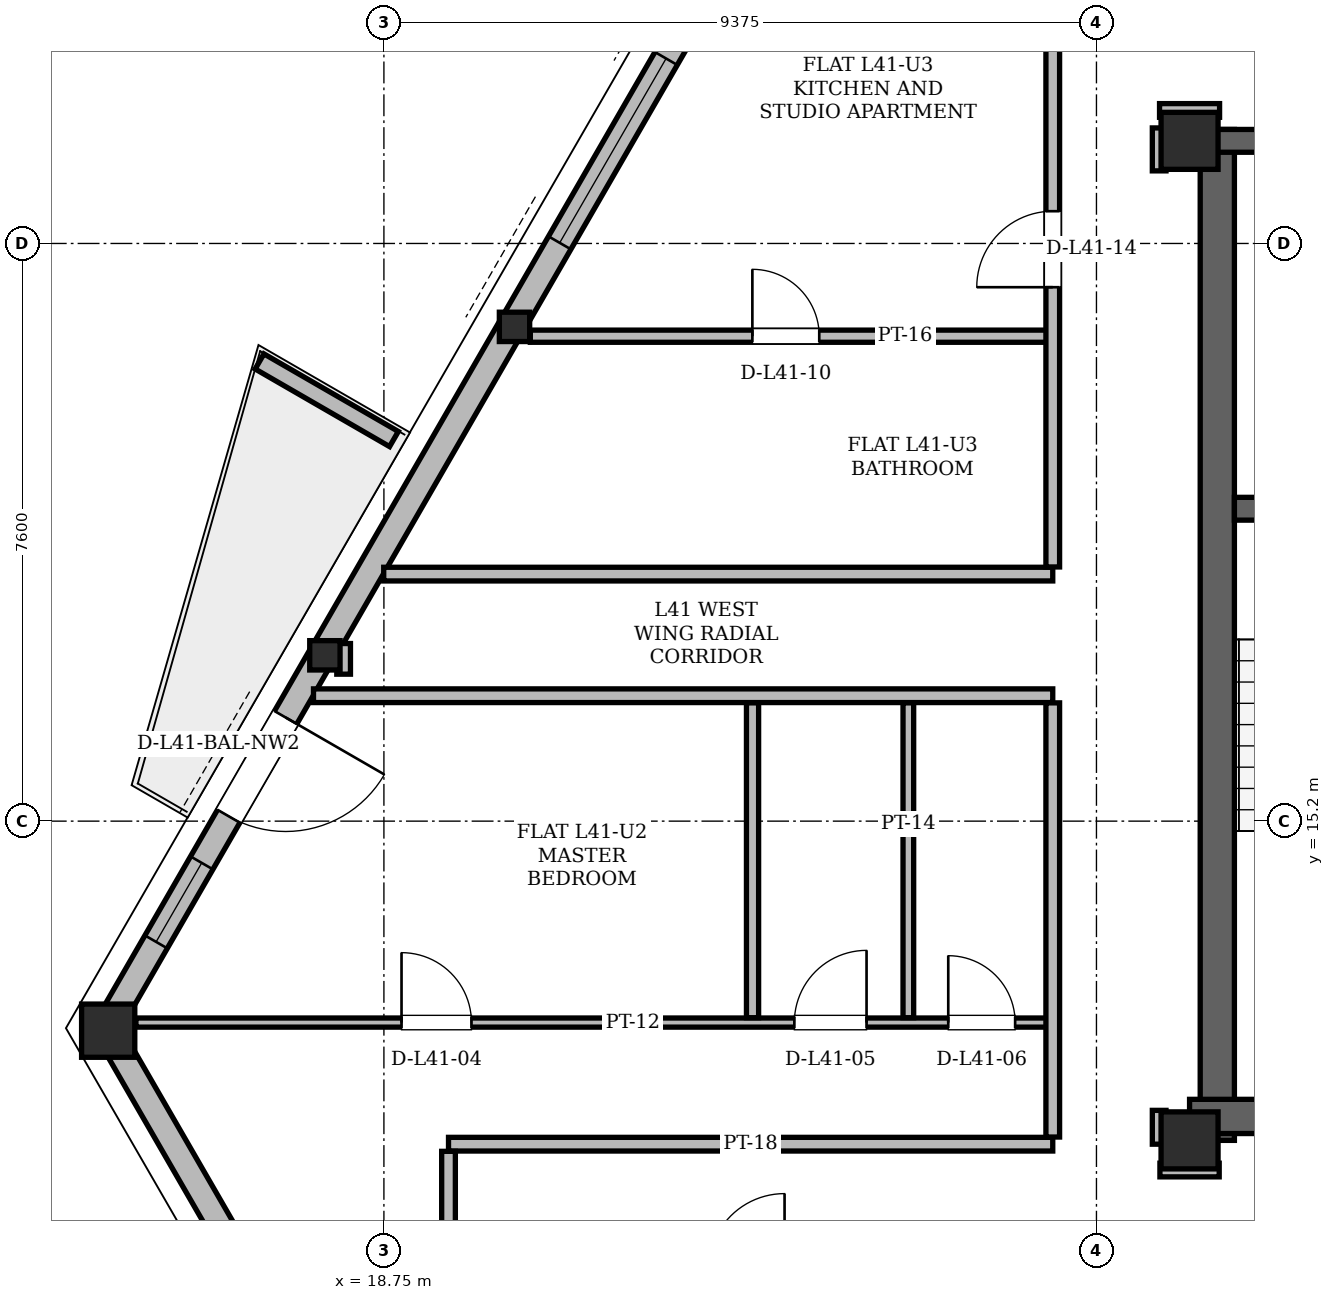
"""IFC4 building model, lengths in metres.
Left out: names, types, materials, properties, quantities, classifications, styles, units other than length and angle.
Written with IfcOpenShell. Run it as: python <this file> out.ifc"""

import sys

from ifc_helpers import new_model, si_unit, direction, frame, frame_2d, origin, origin_2d, place, context, subcontext, project, spatial, polyline, rectangle, hollow_rectangle, i_section, outline, extrude, element, fill, save


model = new_model("IFC4")
c1 = context("Model", 3, precision=1e-05, world=origin(), true_north=direction((0.0, 1.0)))
c2 = subcontext(c1, "Body", "Model", "MODEL_VIEW")
j1 = project(units=[si_unit("LENGTHUNIT", "METRE"), si_unit("PLANEANGLEUNIT", "RADIAN")], contexts=[c1])
p1 = place(None, origin())
s1 = spatial("IfcSite", under=j1, at=p1, CompositionType="ELEMENT")
p2 = place(p1, origin())
s2 = spatial("IfcBuilding", under=s1, at=p2, CompositionType="ELEMENT")
p3 = place(p2, frame((0.0, 0.0, 156.6)))
s3 = spatial("IfcBuildingStorey", under=s2, at=p3, CompositionType="ELEMENT", Elevation=156.6)
for number, where, z_axis, x_axis in (
    (1, (29.35, 11.0, 0.0), (0.0, 0.0, 1.0), (1.0, 0.0, 0.0)),
    (2, (29.35, 24.15, 0.0), (0.0, 0.0, 1.0), (1.0, 0.0, 0.0)),
):
    element("IfcColumn", number, at=place(p3, frame(where, z_axis=z_axis, x_axis=x_axis)), inside=s3, PredefinedType="COLUMN", context=c2, shape_type="SweptSolid", body=[
        extrude(hollow_rectangle(XDim=0.75, YDim=0.75, WallThickness=0.06, at=origin_2d()), origin(), (0.0, 0.0, 1.0), 3.6),
    ])
p4 = place(p3, frame((15.098, 12.477, 0.004), z_axis=(0.013729429674, -0.018555120301, 0.999733569643), x_axis=(0.803870057884, 0.594804951255, 0.0)))
e3 = element("IfcColumn", 3, at=p4, inside=s3, PredefinedType="COLUMN", context=c2, shape_type="SweptSolid", body=[
    extrude(hollow_rectangle(XDim=0.7, YDim=0.7, WallThickness=0.055, at=origin_2d()), origin(), (0.0, 0.0, 1.0), 3.592),
])
p5 = place(p3, frame((20.439, 21.727, 0.004), z_axis=(0.01644873519, -0.013729935985, 0.999770437635), x_axis=(0.640808251005, 0.767700973976, 0.0)))
e4 = element("IfcColumn", 4, at=p5, inside=s3, PredefinedType="COLUMN", context=c2, shape_type="SweptSolid", body=[
    extrude(i_section(OverallWidth=0.399, OverallDepth=0.386, WebThickness=0.021, FlangeThickness=0.033, at=origin_2d()), origin(), (0.0, 0.0, 1.0), 3.592),
])
p6 = place(p3, frame((17.946, 17.41, 0.004), z_axis=(0.0151570935, -0.016040690879, 0.999756449718), x_axis=(0.726842306935, 0.686804383248, 0.0)))
e5 = element("IfcColumn", 5, at=p6, inside=s3, PredefinedType="COLUMN", context=c2, shape_type="SweptSolid", body=[
    extrude(i_section(OverallWidth=0.399, OverallDepth=0.386, WebThickness=0.021, FlangeThickness=0.033, at=origin_2d()), origin(), (0.0, 0.0, 1.0), 3.592),
])
p7 = place(p3, frame((29.715, 11.0, 0.0), z_axis=(0.0, 0.0, 1.0), x_axis=(0.0, 1.0, 0.0)))
e6 = element("IfcWall", 6, at=p7, inside=s3, PredefinedType="SHEAR", context=c2, shape_type="SweptSolid", body=[
    extrude(rectangle(XDim=13.3, YDim=0.45, at=frame_2d((6.65, 0.0))), origin(), (0.0, 0.0, 1.0), 3.38),
])
p8 = place(p3, frame((29.35, 11.315, 0.0), z_axis=(0.0, 0.0, 1.0), x_axis=(1.0, 0.0, 0.0)))
e7 = element("IfcWall", 7, at=p8, inside=s3, PredefinedType="SHEAR", context=c2, shape_type="SweptSolid", body=[
    extrude(rectangle(XDim=7.1, YDim=0.45, at=frame_2d((3.55, 0.0))), origin(), (0.0, 0.0, 1.0), 3.38),
])
p9 = place(p3, frame((29.65, 24.15, 0.0), z_axis=(0.0, 0.0, 1.0), x_axis=(1.0, 0.0, 0.0)))
e8 = element("IfcWall", 8, at=p9, inside=s3, PredefinedType="SHEAR", context=c2, shape_type="SweptSolid", body=[
    extrude(rectangle(XDim=15.7, YDim=0.3, at=frame_2d((7.85, 0.0))), origin(), (0.0, 0.0, 1.0), 3.38),
])
p10 = place(p9, frame((1.7, 0.0, 0.0)))
e9 = element("IfcOpeningElement", 9, at=p10, cuts=e8, PredefinedType="OPENING", context=c2, shape_type="SweptSolid", body=[
    extrude(rectangle(XDim=1.2, YDim=2.2, at=frame_2d((0.6, 1.1))), frame((0.0, 0.15, 0.0), z_axis=(0.0, -1.0, 0.0), x_axis=(1.0, 0.0, 0.0)), (0.0, 0.0, 1.0), 0.3),
])
p11 = place(p9, frame((12.8, 0.0, 0.0)))
e10 = element("IfcOpeningElement", 10, at=p11, cuts=e8, PredefinedType="OPENING", context=c2, shape_type="SweptSolid", body=[
    extrude(rectangle(XDim=1.2, YDim=2.2, at=frame_2d((0.6, 1.1))), frame((0.0, 0.15, 0.0), z_axis=(0.0, -1.0, 0.0), x_axis=(1.0, 0.0, 0.0)), (0.0, 0.0, 1.0), 0.3),
])
p12 = place(p9, frame((6.55, 0.0, 0.0)))
e11 = element("IfcOpeningElement", 11, at=p12, cuts=e8, PredefinedType="OPENING", context=c2, shape_type="SweptSolid", body=[
    extrude(rectangle(XDim=0.9, YDim=2.05, at=frame_2d((0.45, 1.025))), frame((0.0, 0.15, 0.0), z_axis=(0.0, -1.0, 0.0), x_axis=(1.0, 0.0, 0.0)), (0.0, 0.0, 1.0), 0.3),
])
p13 = place(p9, frame((8.45, 0.0, 0.0)))
e12 = element("IfcOpeningElement", 12, at=p13, cuts=e8, PredefinedType="OPENING", context=c2, shape_type="SweptSolid", body=[
    extrude(rectangle(XDim=0.9, YDim=2.05, at=frame_2d((0.45, 1.025))), frame((0.0, 0.15, 0.0), z_axis=(0.0, -1.0, 0.0), x_axis=(1.0, 0.0, 0.0)), (0.0, 0.0, 1.0), 0.3),
])
p14 = place(p3, frame((29.94, 19.31, 0.0), z_axis=(0.0, 0.0, 1.0), x_axis=(1.0, 0.0, 0.0)))
e13 = element("IfcWall", 13, at=p14, inside=s3, PredefinedType="SHEAR", context=c2, shape_type="SweptSolid", body=[
    extrude(rectangle(XDim=4.01, YDim=0.3, at=frame_2d((2.005, 0.0))), origin(), (0.0, 0.0, 1.0), 3.38),
])
p15 = place(p14, frame((1.01, 0.0, 0.0)))
e14 = element("IfcOpeningElement", 14, at=p15, cuts=e13, PredefinedType="OPENING", context=c2, shape_type="SweptSolid", body=[
    extrude(rectangle(XDim=1.4, YDim=2.2, at=frame_2d((0.7, 1.1))), frame((0.0, 0.15, 0.0), z_axis=(0.0, -1.0, 0.0), x_axis=(1.0, 0.0, 0.0)), (0.0, 0.0, 1.0), 0.3),
])
p16 = place(p3, frame((15.098, 12.477, 0.0), z_axis=(0.0, 0.0, 1.0), x_axis=(0.500004288242, -0.866022927952, 0.0)))
e15 = element("IfcWall", 15, at=p16, inside=s3, PredefinedType="SOLIDWALL", context=c2, shape_type="SweptSolid", body=[
    extrude(rectangle(XDim=9.198, YDim=0.34, at=frame_2d((4.599, 0.0))), origin(), (0.0, 0.0, 1.0), 2.6),
])
p17 = place(p3, frame((32.901, 43.313, 0.0), z_axis=(0.0, 0.0, 1.0), x_axis=(-0.499998839087, -0.866026074037, 0.0)))
e16 = element("IfcWall", 16, at=p17, inside=s3, PredefinedType="SOLIDWALL", context=c2, shape_type="SweptSolid", body=[
    extrude(rectangle(XDim=35.606, YDim=0.34, at=frame_2d((17.803, 0.0))), origin(), (0.0, 0.0, 1.0), 2.6),
])
p18 = place(p17, frame((8.034, 0.0, 0.0)))
e17 = element("IfcOpeningElement", 17, at=p18, cuts=e16, PredefinedType="OPENING", context=c2, shape_type="SweptSolid", body=[
    extrude(rectangle(XDim=1.5, YDim=2.2, at=frame_2d((0.75, 1.1))), frame((0.0, 0.17, 0.0), z_axis=(0.0, -1.0, 0.0), x_axis=(1.0, 0.0, 0.0)), (0.0, 0.0, 1.0), 0.34),
])
p19 = place(p17, frame((30.887, 0.0, 0.0)))
e18 = element("IfcOpeningElement", 18, at=p19, cuts=e16, PredefinedType="OPENING", context=c2, shape_type="SweptSolid", body=[
    extrude(rectangle(XDim=1.5, YDim=2.2, at=frame_2d((0.75, 1.1))), frame((0.0, 0.17, 0.0), z_axis=(0.0, -1.0, 0.0), x_axis=(1.0, 0.0, 0.0)), (0.0, 0.0, 1.0), 0.34),
])
p20 = place(p17, frame((33.096, 0.0, 0.85)))
e19 = element("IfcOpeningElement", 19, at=p20, cuts=e16, PredefinedType="OPENING", context=c2, shape_type="SweptSolid", body=[
    extrude(rectangle(XDim=1.2, YDim=1.48, at=frame_2d((0.6, 0.74))), frame((0.0, 0.17, 0.0), z_axis=(0.0, -1.0, 0.0), x_axis=(1.0, 0.0, 0.0)), (0.0, 0.0, 1.0), 0.34),
])
p21 = place(p17, frame((13.168, 0.0, 0.85)))
e20 = element("IfcOpeningElement", 20, at=p21, cuts=e16, PredefinedType="OPENING", context=c2, shape_type="SweptSolid", body=[
    extrude(rectangle(XDim=1.2, YDim=1.48, at=frame_2d((0.6, 0.74))), frame((0.0, 0.17, 0.0), z_axis=(0.0, -1.0, 0.0), x_axis=(1.0, 0.0, 0.0)), (0.0, 0.0, 1.0), 0.34),
])
p22 = place(p17, frame((20.876, 0.0, 0.85)))
e21 = element("IfcOpeningElement", 21, at=p22, cuts=e16, PredefinedType="OPENING", context=c2, shape_type="SweptSolid", body=[
    extrude(rectangle(XDim=2.8, YDim=1.64, at=frame_2d((1.4, 0.82))), frame((0.0, 0.17, 0.0), z_axis=(0.0, -1.0, 0.0), x_axis=(1.0, 0.0, 0.0)), (0.0, 0.0, 1.0), 0.34),
])
p23 = place(p17, frame((2.906, 0.0, 0.85)))
e22 = element("IfcOpeningElement", 22, at=p23, cuts=e16, PredefinedType="OPENING", context=c2, shape_type="SweptSolid", body=[
    extrude(rectangle(XDim=1.6, YDim=1.64, at=frame_2d((0.8, 0.82))), frame((0.0, 0.17, 0.0), z_axis=(0.0, -1.0, 0.0), x_axis=(1.0, 0.0, 0.0)), (0.0, 0.0, 1.0), 0.34),
])
p24 = place(p3, frame((18.882, 20.227, 0.0), z_axis=(0.0, 0.0, 1.0), x_axis=(-0.866042246008, 0.499970827278, 0.0)))
e23 = element("IfcWall", 23, at=p24, inside=s3, PredefinedType="PARAPET", context=c2, shape_type="SweptSolid", body=[
    extrude(outline(polyline([(0.0, 0.0), (2.042, 0.0), (2.042, 1.1), (0.0, 1.32), (0.0, 0.0)])), frame((0.0, 0.115, 0.0), z_axis=(0.0, -1.0, 0.0), x_axis=(1.0, 0.0, 0.0)), (0.0, 0.0, 1.0), 0.23),
])
p25 = place(p3, frame((28.96, 10.61, 0.0), z_axis=(0.0, 0.0, 1.0), x_axis=(1.0, 0.0, 0.0)))
e24 = element("IfcWall", 24, at=p25, inside=s3, PredefinedType="PARTITIONING", context=c2, shape_type="SweptSolid", body=[
    extrude(rectangle(XDim=0.78, YDim=0.18, at=frame_2d((0.39, 0.0))), origin(), (0.0, 0.0, 1.0), 3.38),
])
p26 = place(p3, frame((19.6, 10.95, 0.0), z_axis=(0.0, 0.0, 1.0), x_axis=(1.0, 0.0, 0.0)))
e25 = element("IfcWall", 25, at=p26, inside=s3, PredefinedType="PARTITIONING", context=c2, shape_type="SweptSolid", body=[
    extrude(rectangle(XDim=7.95, YDim=0.18, at=frame_2d((3.975, 0.0))), origin(), (0.0, 0.0, 1.0), 3.38),
])
p27 = place(p3, frame((15.487, 12.55, 0.0), z_axis=(0.0, 0.0, 1.0), x_axis=(1.0, 0.0, 0.0)))
e26 = element("IfcWall", 26, at=p27, inside=s3, PredefinedType="PARTITIONING", context=c2, shape_type="SweptSolid", body=[
    extrude(rectangle(XDim=12.113, YDim=0.12, at=frame_2d((6.056, 0.0))), origin(), (0.0, 0.0, 1.0), 3.38),
])
p28 = place(p27, frame((3.494, 0.0, 0.0)))
e27 = element("IfcOpeningElement", 27, at=p28, cuts=e26, PredefinedType="OPENING", context=c2, shape_type="SweptSolid", body=[
    extrude(rectangle(XDim=0.92, YDim=2.12, at=frame_2d((0.46, 1.06))), frame((0.0, 0.06, 0.0), z_axis=(0.0, -1.0, 0.0), x_axis=(1.0, 0.0, 0.0)), (0.0, 0.0, 1.0), 0.12),
])
p29 = place(p27, frame((8.663, 0.0, 0.0)))
e28 = element("IfcOpeningElement", 28, at=p29, cuts=e26, PredefinedType="OPENING", context=c2, shape_type="SweptSolid", body=[
    extrude(rectangle(XDim=0.95, YDim=2.1, at=frame_2d((0.475, 1.05))), frame((0.0, 0.06, 0.0), z_axis=(0.0, -1.0, 0.0), x_axis=(1.0, 0.0, 0.0)), (0.0, 0.0, 1.0), 0.12),
])
p30 = place(p27, frame((10.688, 0.0, 0.0)))
e29 = element("IfcOpeningElement", 29, at=p30, cuts=e26, PredefinedType="OPENING", context=c2, shape_type="SweptSolid", body=[
    extrude(rectangle(XDim=0.88, YDim=2.08, at=frame_2d((0.44, 1.04))), frame((0.0, 0.06, 0.0), z_axis=(0.0, -1.0, 0.0), x_axis=(1.0, 0.0, 0.0)), (0.0, 0.0, 1.0), 0.12),
])
p31 = place(p3, frame((17.823, 16.85, 0.0), z_axis=(0.0, 0.0, 1.0), x_axis=(1.0, 0.0, 0.0)))
e30 = element("IfcWall", 30, at=p31, inside=s3, PredefinedType="PARTITIONING", context=c2, shape_type="SweptSolid", body=[
    extrude(rectangle(XDim=9.727, YDim=0.18, at=frame_2d((4.863, 0.0))), origin(), (0.0, 0.0, 1.0), 3.38),
])
p32 = place(p3, frame((18.747, 18.45, 0.0), z_axis=(0.0, 0.0, 1.0), x_axis=(1.0, 0.0, 0.0)))
e31 = element("IfcWall", 31, at=p32, inside=s3, PredefinedType="PARTITIONING", context=c2, shape_type="SweptSolid", body=[
    extrude(rectangle(XDim=8.803, YDim=0.18, at=frame_2d((4.401, 0.0))), origin(), (0.0, 0.0, 1.0), 3.38),
])
p33 = place(p3, frame((20.676, 21.58, 0.0), z_axis=(0.0, 0.0, 1.0), x_axis=(1.0, 0.0, 0.0)))
e32 = element("IfcWall", 32, at=p33, inside=s3, PredefinedType="PARTITIONING", context=c2, shape_type="SweptSolid", body=[
    extrude(rectangle(XDim=6.956, YDim=0.16, at=frame_2d((3.478, 0.0))), origin(), (0.0, 0.0, 1.0), 3.38),
])
p34 = place(p33, frame((2.922, 0.0, 0.0)))
e33 = element("IfcOpeningElement", 33, at=p34, cuts=e32, PredefinedType="OPENING", context=c2, shape_type="SweptSolid", body=[
    extrude(rectangle(XDim=0.88, YDim=2.08, at=frame_2d((0.44, 1.04))), frame((0.0, 0.08, 0.0), z_axis=(0.0, -1.0, 0.0), x_axis=(1.0, 0.0, 0.0)), (0.0, 0.0, 1.0), 0.16),
])
p35 = place(p3, frame((28.955, 24.55, 0.0), z_axis=(0.0, 0.0, 1.0), x_axis=(1.0, 0.0, 0.0)))
e34 = element("IfcWall", 34, at=p35, inside=s3, PredefinedType="PARTITIONING", context=c2, shape_type="SweptSolid", body=[
    extrude(rectangle(XDim=0.79, YDim=0.18, at=frame_2d((0.395, 0.0))), origin(), (0.0, 0.0, 1.0), 2.842),
])
p36 = place(p3, frame((18.22, 17.133, 0.0), z_axis=(0.0, 0.0, 1.0), x_axis=(0.0, 1.0, 0.0)))
e35 = element("IfcWall", 35, at=p36, inside=s3, PredefinedType="PARTITIONING", context=c2, shape_type="SweptSolid", body=[
    extrude(rectangle(XDim=0.403, YDim=0.18, at=frame_2d((0.202, 0.0))), origin(), (0.0, 0.0, 1.0), 3.38),
])
p37 = place(p3, frame((19.6, 9.394, 0.0), z_axis=(0.0, 0.0, 1.0), x_axis=(0.0, 1.0, 0.0)))
e36 = element("IfcWall", 36, at=p37, inside=s3, PredefinedType="PARTITIONING", context=c2, shape_type="SweptSolid", body=[
    extrude(rectangle(XDim=1.462, YDim=0.18, at=frame_2d((0.731, 0.0))), origin(), (0.0, 0.0, 1.0), 3.38),
])
p38 = place(p3, frame((23.6, 12.614, 0.0), z_axis=(0.0, 0.0, 1.0), x_axis=(0.0, 1.0, 0.0)))
e37 = element("IfcWall", 37, at=p38, inside=s3, PredefinedType="PARTITIONING", context=c2, shape_type="SweptSolid", body=[
    extrude(rectangle(XDim=4.142, YDim=0.16, at=frame_2d((2.071, 0.0))), origin(), (0.0, 0.0, 1.0), 3.38),
])
p39 = place(p3, frame((25.65, 12.614, 0.0), z_axis=(0.0, 0.0, 1.0), x_axis=(0.0, 1.0, 0.0)))
e38 = element("IfcWall", 38, at=p39, inside=s3, PredefinedType="PARTITIONING", context=c2, shape_type="SweptSolid", body=[
    extrude(rectangle(XDim=4.142, YDim=0.14, at=frame_2d((2.071, 0.0))), origin(), (0.0, 0.0, 1.0), 3.38),
])
p40 = place(p3, frame((27.55, 11.044, 0.0), z_axis=(0.0, 0.0, 1.0), x_axis=(0.0, 1.0, 0.0)))
e39 = element("IfcWall", 39, at=p40, inside=s3, PredefinedType="PARTITIONING", context=c2, shape_type="SweptSolid", body=[
    extrude(rectangle(XDim=5.712, YDim=0.18, at=frame_2d((2.856, 0.0))), origin(), (0.0, 0.0, 1.0), 2.842),
])
p41 = place(p3, frame((27.55, 18.544, 0.0), z_axis=(0.0, 0.0, 1.0), x_axis=(0.0, 1.0, 0.0)))
e40 = element("IfcWall", 40, at=p41, inside=s3, PredefinedType="PARTITIONING", context=c2, shape_type="SweptSolid", body=[
    extrude(rectangle(XDim=15.153, YDim=0.18, at=frame_2d((7.576, 0.0))), origin(), (0.0, 0.0, 1.0), 3.38),
])
p42 = place(p41, frame((3.68, 0.0, 0.0)))
e41 = element("IfcOpeningElement", 41, at=p42, cuts=e40, PredefinedType="OPENING", context=c2, shape_type="SweptSolid", body=[
    extrude(rectangle(XDim=1.0, YDim=2.18, at=frame_2d((0.5, 1.09))), frame((0.0, 0.09, 0.0), z_axis=(0.0, -1.0, 0.0), x_axis=(1.0, 0.0, 0.0)), (0.0, 0.0, 1.0), 0.18),
])
p43 = place(p3, frame((28.95, 10.95, 0.0), z_axis=(0.0, 0.0, 1.0), x_axis=(0.0, 1.0, 0.0)))
e42 = element("IfcWall", 42, at=p43, inside=s3, PredefinedType="PARTITIONING", context=c2, shape_type="SweptSolid", body=[
    extrude(rectangle(XDim=0.445, YDim=0.18, at=frame_2d((0.223, 0.0))), origin(), (0.0, 0.0, 1.0), 2.842),
])
p44 = place(p3, frame((28.95, 23.755, 0.0), z_axis=(0.0, 0.0, 1.0), x_axis=(0.0, 1.0, 0.0)))
e43 = element("IfcWall", 43, at=p44, inside=s3, PredefinedType="PARTITIONING", context=c2, shape_type="SweptSolid", body=[
    extrude(rectangle(XDim=0.565, YDim=0.18, at=frame_2d((0.283, 0.0))), origin(), (0.0, 0.0, 1.0), 3.38),
])
p45 = place(p19, origin())
e44 = element("IfcDoor", 44, at=p45, inside=s3, OperationType="SINGLE_SWING_LEFT", PredefinedType="DOOR", context=c2, shape_type="SweptSolid", body=[
    extrude(rectangle(XDim=1.5, YDim=2.2, at=frame_2d((0.75, 1.1))), frame((0.0, 0.025, 0.0), z_axis=(0.0, -1.0, 0.0), x_axis=(1.0, 0.0, 0.0)), (0.0, 0.0, 1.0), 0.05),
])
fill(e18, e44)
p46 = place(p20, origin())
e45 = element("IfcWindow", 45, at=p46, inside=s3, PartitioningType="SINGLE_PANEL", PredefinedType="WINDOW", context=c2, shape_type="SweptSolid", body=[
    extrude(rectangle(XDim=1.2, YDim=1.48, at=frame_2d((0.6, 0.74))), frame((0.0, 0.03, 0.0), z_axis=(0.0, -1.0, 0.0), x_axis=(1.0, 0.0, 0.0)), (0.0, 0.0, 1.0), 0.06),
])
fill(e19, e45)
p47 = place(p22, origin())
e46 = element("IfcWindow", 46, at=p47, inside=s3, PartitioningType="SINGLE_PANEL", PredefinedType="WINDOW", context=c2, shape_type="SweptSolid", body=[
    extrude(rectangle(XDim=2.8, YDim=1.64, at=frame_2d((1.4, 0.82))), frame((0.0, 0.03, 0.0), z_axis=(0.0, -1.0, 0.0), x_axis=(1.0, 0.0, 0.0)), (0.0, 0.0, 1.0), 0.06),
])
fill(e21, e46)
p48 = place(p28, origin())
e47 = element("IfcDoor", 47, at=p48, inside=s3, OperationType="SINGLE_SWING_LEFT", PredefinedType="DOOR", context=c2, shape_type="SweptSolid", body=[
    extrude(rectangle(XDim=0.92, YDim=2.12, at=frame_2d((0.46, 1.06))), frame((0.0, 0.025, 0.0), z_axis=(0.0, -1.0, 0.0), x_axis=(1.0, 0.0, 0.0)), (0.0, 0.0, 1.0), 0.05),
])
fill(e27, e47)
p49 = place(p29, origin())
e48 = element("IfcDoor", 48, at=p49, inside=s3, OperationType="SINGLE_SWING_RIGHT", PredefinedType="DOOR", context=c2, shape_type="SweptSolid", body=[
    extrude(rectangle(XDim=0.95, YDim=2.1, at=frame_2d((0.475, 1.05))), frame((0.0, 0.025, 0.0), z_axis=(0.0, -1.0, 0.0), x_axis=(1.0, 0.0, 0.0)), (0.0, 0.0, 1.0), 0.05),
])
fill(e28, e48)
p50 = place(p30, origin())
e49 = element("IfcDoor", 49, at=p50, inside=s3, OperationType="SINGLE_SWING_LEFT", PredefinedType="DOOR", context=c2, shape_type="SweptSolid", body=[
    extrude(rectangle(XDim=0.88, YDim=2.08, at=frame_2d((0.44, 1.04))), frame((0.0, 0.025, 0.0), z_axis=(0.0, -1.0, 0.0), x_axis=(1.0, 0.0, 0.0)), (0.0, 0.0, 1.0), 0.05),
])
fill(e29, e49)
p51 = place(p34, origin())
e50 = element("IfcDoor", 50, at=p51, inside=s3, OperationType="SINGLE_SWING_LEFT", PredefinedType="DOOR", context=c2, shape_type="SweptSolid", body=[
    extrude(rectangle(XDim=0.88, YDim=2.08, at=frame_2d((0.44, 1.04))), frame((0.0, 0.025, 0.0), z_axis=(0.0, -1.0, 0.0), x_axis=(1.0, 0.0, 0.0)), (0.0, 0.0, 1.0), 0.05),
])
fill(e33, e50)
p52 = place(p42, origin())
e51 = element("IfcDoor", 51, at=p52, inside=s3, OperationType="SINGLE_SWING_LEFT", PredefinedType="DOOR", context=c2, shape_type="SweptSolid", body=[
    extrude(rectangle(XDim=1.0, YDim=2.18, at=frame_2d((0.5, 1.09))), frame((0.0, 0.025, 0.0), z_axis=(0.0, -1.0, 0.0), x_axis=(1.0, 0.0, 0.0)), (0.0, 0.0, 1.0), 0.05),
])
fill(e41, e51)
save(model, sys.argv[1])
